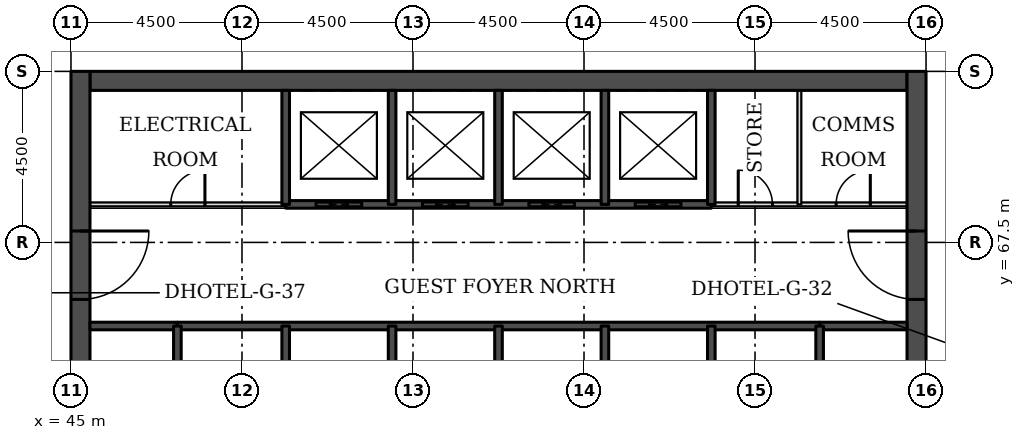
"""IFC4 building model, lengths in metres.
Left out: names, types, materials, properties, quantities, classifications, styles, units other than length and angle.
Written with IfcOpenShell. Run it as: python <this file> out.ifc"""

import sys

from ifc_helpers import new_model, si_unit, direction, frame, frame_2d, origin, place, context, subcontext, project, spatial, rectangle, extrude, element, fill, save


model = new_model("IFC4")
c1 = context("Model", 3, precision=1e-05, world=origin(), true_north=direction((0.0, 1.0)))
c2 = subcontext(c1, "Body", "Model", "MODEL_VIEW")
j1 = project(units=[si_unit("LENGTHUNIT", "METRE"), si_unit("PLANEANGLEUNIT", "RADIAN")], contexts=[c1])
p1 = place(None, origin())
s1 = spatial("IfcSite", under=j1, at=p1, CompositionType="ELEMENT")
p2 = place(p1, origin())
s2 = spatial("IfcBuilding", under=s1, at=p2, CompositionType="ELEMENT")
p3 = place(p2, frame((0.0, 0.0, 66.0)))
s3 = spatial("IfcBuildingStorey", under=s2, at=p3, CompositionType="ELEMENT", Elevation=66.0)
p4 = place(p3, frame((45.5, 71.75, 0.0), z_axis=(0.0, 0.0, 1.0), x_axis=(1.0, 0.0, 0.0)))
e1 = element("IfcWall", 1, at=p4, inside=s3, PredefinedType="SHEAR", context=c2, shape_type="SweptSolid", body=[
    extrude(rectangle(XDim=21.5, YDim=0.5, at=frame_2d((10.75, 0.0))), origin(), (0.0, 0.0, 1.0), 3.3),
])
p5 = place(p3, frame((45.25, 49.5, 0.0), z_axis=(0.0, 0.0, 1.0), x_axis=(0.0, 1.0, 0.0)))
e2 = element("IfcWall", 2, at=p5, inside=s3, PredefinedType="SHEAR", context=c2, shape_type="SweptSolid", body=[
    extrude(rectangle(XDim=22.5, YDim=0.5, at=frame_2d((11.25, 0.0))), origin(), (0.0, 0.0, 1.0), 3.3),
])
p6 = place(p5, frame((4.2, 0.0, 0.0)))
e3 = element("IfcOpeningElement", 3, at=p6, cuts=e2, PredefinedType="OPENING", context=c2, shape_type="SweptSolid", body=[
    extrude(rectangle(XDim=1.8, YDim=2.1, at=frame_2d((0.9, 1.05))), frame((0.0, 0.26, 0.0), z_axis=(0.0, -1.0, 0.0), x_axis=(1.0, 0.0, 0.0)), (0.0, 0.0, 1.0), 0.52),
])
p7 = place(p5, frame((6.9, 0.0, 0.0)))
e4 = element("IfcOpeningElement", 4, at=p7, cuts=e2, PredefinedType="OPENING", context=c2, shape_type="SweptSolid", body=[
    extrude(rectangle(XDim=1.1, YDim=2.1, at=frame_2d((0.55, 1.05))), frame((0.0, 0.26, 0.0), z_axis=(0.0, -1.0, 0.0), x_axis=(1.0, 0.0, 0.0)), (0.0, 0.0, 1.0), 0.52),
])
p8 = place(p5, frame((13.6, 0.0, 0.0)))
e5 = element("IfcOpeningElement", 5, at=p8, cuts=e2, PredefinedType="OPENING", context=c2, shape_type="SweptSolid", body=[
    extrude(rectangle(XDim=1.1, YDim=2.1, at=frame_2d((0.55, 1.05))), frame((0.0, 0.26, 0.0), z_axis=(0.0, -1.0, 0.0), x_axis=(1.0, 0.0, 0.0)), (0.0, 0.0, 1.0), 0.52),
])
p9 = place(p5, frame((16.5, 0.0, 0.0)))
e6 = element("IfcOpeningElement", 6, at=p9, cuts=e2, PredefinedType="OPENING", context=c2, shape_type="SweptSolid", body=[
    extrude(rectangle(XDim=1.8, YDim=2.1, at=frame_2d((0.9, 1.05))), frame((0.0, 0.26, 0.0), z_axis=(0.0, -1.0, 0.0), x_axis=(1.0, 0.0, 0.0)), (0.0, 0.0, 1.0), 0.52),
])
p10 = place(p3, frame((67.25, 49.5, 0.0), z_axis=(0.0, 0.0, 1.0), x_axis=(0.0, 1.0, 0.0)))
e7 = element("IfcWall", 7, at=p10, inside=s3, PredefinedType="SHEAR", context=c2, shape_type="SweptSolid", body=[
    extrude(rectangle(XDim=22.5, YDim=0.5, at=frame_2d((11.25, 0.0))), origin(), (0.0, 0.0, 1.0), 3.3),
])
p11 = place(p10, frame((4.2, 0.0, 0.0)))
e8 = element("IfcOpeningElement", 8, at=p11, cuts=e7, PredefinedType="OPENING", context=c2, shape_type="SweptSolid", body=[
    extrude(rectangle(XDim=1.8, YDim=2.1, at=frame_2d((0.9, 1.05))), frame((0.0, 0.26, 0.0), z_axis=(0.0, -1.0, 0.0), x_axis=(1.0, 0.0, 0.0)), (0.0, 0.0, 1.0), 0.52),
])
p12 = place(p10, frame((6.9, 0.0, 0.0)))
e9 = element("IfcOpeningElement", 9, at=p12, cuts=e7, PredefinedType="OPENING", context=c2, shape_type="SweptSolid", body=[
    extrude(rectangle(XDim=1.1, YDim=2.1, at=frame_2d((0.55, 1.05))), frame((0.0, 0.26, 0.0), z_axis=(0.0, -1.0, 0.0), x_axis=(1.0, 0.0, 0.0)), (0.0, 0.0, 1.0), 0.52),
])
p13 = place(p10, frame((13.6, 0.0, 0.0)))
e10 = element("IfcOpeningElement", 10, at=p13, cuts=e7, PredefinedType="OPENING", context=c2, shape_type="SweptSolid", body=[
    extrude(rectangle(XDim=1.1, YDim=2.1, at=frame_2d((0.55, 1.05))), frame((0.0, 0.26, 0.0), z_axis=(0.0, -1.0, 0.0), x_axis=(1.0, 0.0, 0.0)), (0.0, 0.0, 1.0), 0.52),
])
p14 = place(p10, frame((16.5, 0.0, 0.0)))
e11 = element("IfcOpeningElement", 11, at=p14, cuts=e7, PredefinedType="OPENING", context=c2, shape_type="SweptSolid", body=[
    extrude(rectangle(XDim=1.8, YDim=2.1, at=frame_2d((0.9, 1.05))), frame((0.0, 0.26, 0.0), z_axis=(0.0, -1.0, 0.0), x_axis=(1.0, 0.0, 0.0)), (0.0, 0.0, 1.0), 0.52),
])
for number, where, z_axis, x_axis in (
    (12, (45.5, 65.3, 0.0), (0.0, 0.0, 1.0), (1.0, 0.0, 0.0)),
    (13, (64.7, 65.3, 0.0), (0.0, 0.0, 1.0), (1.0, 0.0, 0.0)),
):
    element("IfcWall", number, at=place(p3, frame(where, z_axis=z_axis, x_axis=x_axis)), inside=s3, PredefinedType="SOLIDWALL", context=c2, shape_type="SweptSolid", body=[
        extrude(rectangle(XDim=2.3, YDim=0.2, at=frame_2d((1.15, 0.0))), origin(), (0.0, 0.0, 1.0), 3.08),
    ])
p15 = place(p3, frame((47.8, 65.3, 0.0), z_axis=(0.0, 0.0, 1.0), x_axis=(1.0, 0.0, 0.0)))
e14 = element("IfcWall", 14, at=p15, inside=s3, PredefinedType="SOLIDWALL", context=c2, shape_type="SweptSolid", body=[
    extrude(rectangle(XDim=16.9, YDim=0.2, at=frame_2d((8.45, 0.0))), origin(), (0.0, 0.0, 1.0), 3.08),
])
p16 = place(p3, frame((45.5, 68.5, 0.0), z_axis=(0.0, 0.0, 1.0), x_axis=(1.0, 0.0, 0.0)))
e15 = element("IfcWall", 15, at=p16, inside=s3, PredefinedType="PARTITIONING", context=c2, shape_type="SweptSolid", body=[
    extrude(rectangle(XDim=5.15, YDim=0.1, at=frame_2d((2.575, 0.0))), origin(), (0.0, 0.0, 1.0), 3.08),
])
p17 = place(p16, frame((2.125, 0.0, 0.0)))
e16 = element("IfcOpeningElement", 16, at=p17, cuts=e15, PredefinedType="OPENING", context=c2, shape_type="SweptSolid", body=[
    extrude(rectangle(XDim=0.9, YDim=2.1, at=frame_2d((0.45, 1.05))), frame((0.0, 0.06, 0.0), z_axis=(0.0, -1.0, 0.0), x_axis=(1.0, 0.0, 0.0)), (0.0, 0.0, 1.0), 0.12),
])
p18 = place(p3, frame((61.85, 68.5, 0.0), z_axis=(0.0, 0.0, 1.0), x_axis=(1.0, 0.0, 0.0)))
e17 = element("IfcWall", 17, at=p18, inside=s3, PredefinedType="PARTITIONING", context=c2, shape_type="SweptSolid", body=[
    extrude(rectangle(XDim=5.15, YDim=0.1, at=frame_2d((2.575, 0.0))), origin(), (0.0, 0.0, 1.0), 3.08),
])
p19 = place(p18, frame((3.284, 0.0, 0.0)))
e18 = element("IfcOpeningElement", 18, at=p19, cuts=e17, PredefinedType="OPENING", context=c2, shape_type="SweptSolid", body=[
    extrude(rectangle(XDim=0.9, YDim=2.1, at=frame_2d((0.45, 1.05))), frame((0.0, 0.06, 0.0), z_axis=(0.0, -1.0, 0.0), x_axis=(1.0, 0.0, 0.0)), (0.0, 0.0, 1.0), 0.12),
])
p20 = place(p18, frame((0.709, 0.0, 0.0)))
e19 = element("IfcOpeningElement", 19, at=p20, cuts=e17, PredefinedType="OPENING", context=c2, shape_type="SweptSolid", body=[
    extrude(rectangle(XDim=0.9, YDim=2.1, at=frame_2d((0.45, 1.05))), frame((0.0, 0.06, 0.0), z_axis=(0.0, -1.0, 0.0), x_axis=(1.0, 0.0, 0.0)), (0.0, 0.0, 1.0), 0.12),
])
p21 = place(p3, frame((50.65, 68.5, 0.0), z_axis=(0.0, 0.0, 1.0), x_axis=(1.0, 0.0, 0.0)))
e20 = element("IfcWall", 20, at=p21, inside=s3, PredefinedType="SOLIDWALL", context=c2, shape_type="SweptSolid", body=[
    extrude(rectangle(XDim=11.2, YDim=0.2, at=frame_2d((5.6, 0.0))), origin(), (0.0, 0.0, 1.0), 3.08),
])
p22 = place(p21, frame((0.8, 0.0, 0.0)))
e21 = element("IfcOpeningElement", 21, at=p22, cuts=e20, PredefinedType="OPENING", context=c2, shape_type="SweptSolid", body=[
    extrude(rectangle(XDim=1.2, YDim=2.1, at=frame_2d((0.6, 1.05))), frame((0.0, 0.11, 0.0), z_axis=(0.0, -1.0, 0.0), x_axis=(1.0, 0.0, 0.0)), (0.0, 0.0, 1.0), 0.22),
])
p23 = place(p21, frame((3.6, 0.0, 0.0)))
e22 = element("IfcOpeningElement", 22, at=p23, cuts=e20, PredefinedType="OPENING", context=c2, shape_type="SweptSolid", body=[
    extrude(rectangle(XDim=1.2, YDim=2.1, at=frame_2d((0.6, 1.05))), frame((0.0, 0.11, 0.0), z_axis=(0.0, -1.0, 0.0), x_axis=(1.0, 0.0, 0.0)), (0.0, 0.0, 1.0), 0.22),
])
p24 = place(p21, frame((6.4, 0.0, 0.0)))
e23 = element("IfcOpeningElement", 23, at=p24, cuts=e20, PredefinedType="OPENING", context=c2, shape_type="SweptSolid", body=[
    extrude(rectangle(XDim=1.2, YDim=2.1, at=frame_2d((0.6, 1.05))), frame((0.0, 0.11, 0.0), z_axis=(0.0, -1.0, 0.0), x_axis=(1.0, 0.0, 0.0)), (0.0, 0.0, 1.0), 0.22),
])
p25 = place(p21, frame((9.2, 0.0, 0.0)))
e24 = element("IfcOpeningElement", 24, at=p25, cuts=e20, PredefinedType="OPENING", context=c2, shape_type="SweptSolid", body=[
    extrude(rectangle(XDim=1.2, YDim=2.1, at=frame_2d((0.6, 1.05))), frame((0.0, 0.11, 0.0), z_axis=(0.0, -1.0, 0.0), x_axis=(1.0, 0.0, 0.0)), (0.0, 0.0, 1.0), 0.22),
])
p26 = place(p3, frame((47.8, 62.0, 0.0), z_axis=(0.0, 0.0, 1.0), x_axis=(0.0, 1.0, 0.0)))
e25 = element("IfcWall", 25, at=p26, inside=s3, PredefinedType="SOLIDWALL", context=c2, shape_type="SweptSolid", body=[
    extrude(rectangle(XDim=3.3, YDim=0.2, at=frame_2d((1.65, 0.0))), origin(), (0.0, 0.0, 1.0), 3.08),
])
p27 = place(p26, frame((1.1, 0.0, 0.0)))
e26 = element("IfcOpeningElement", 26, at=p27, cuts=e25, PredefinedType="OPENING", context=c2, shape_type="SweptSolid", body=[
    extrude(rectangle(XDim=1.1, YDim=2.1, at=frame_2d((0.55, 1.05))), frame((0.0, 0.11, 0.0), z_axis=(0.0, -1.0, 0.0), x_axis=(1.0, 0.0, 0.0)), (0.0, 0.0, 1.0), 0.22),
])
p28 = place(p3, frame((50.65, 62.0, 0.0), z_axis=(0.0, 0.0, 1.0), x_axis=(0.0, 1.0, 0.0)))
e27 = element("IfcWall", 27, at=p28, inside=s3, PredefinedType="SOLIDWALL", context=c2, shape_type="SweptSolid", body=[
    extrude(rectangle(XDim=3.3, YDim=0.2, at=frame_2d((1.65, 0.0))), origin(), (0.0, 0.0, 1.0), 3.08),
])
p29 = place(p3, frame((50.65, 68.5, 0.0), z_axis=(0.0, 0.0, 1.0), x_axis=(0.0, 1.0, 0.0)))
e28 = element("IfcWall", 28, at=p29, inside=s3, PredefinedType="SOLIDWALL", context=c2, shape_type="SweptSolid", body=[
    extrude(rectangle(XDim=3.0, YDim=0.2, at=frame_2d((1.5, 0.0))), origin(), (0.0, 0.0, 1.0), 3.08),
])
p30 = place(p3, frame((53.45, 62.5, 0.0), z_axis=(0.0, 0.0, 1.0), x_axis=(0.0, 1.0, 0.0)))
e29 = element("IfcWall", 29, at=p30, inside=s3, PredefinedType="SOLIDWALL", context=c2, shape_type="SweptSolid", body=[
    extrude(rectangle(XDim=2.8, YDim=0.2, at=frame_2d((1.4, 0.0))), origin(), (0.0, 0.0, 1.0), 3.08),
])
p31 = place(p3, frame((53.45, 68.5, 0.0), z_axis=(0.0, 0.0, 1.0), x_axis=(0.0, 1.0, 0.0)))
e30 = element("IfcWall", 30, at=p31, inside=s3, PredefinedType="SOLIDWALL", context=c2, shape_type="SweptSolid", body=[
    extrude(rectangle(XDim=3.0, YDim=0.2, at=frame_2d((1.5, 0.0))), origin(), (0.0, 0.0, 1.0), 3.08),
])
p32 = place(p3, frame((56.25, 62.5, 0.0), z_axis=(0.0, 0.0, 1.0), x_axis=(0.0, 1.0, 0.0)))
e31 = element("IfcWall", 31, at=p32, inside=s3, PredefinedType="SOLIDWALL", context=c2, shape_type="SweptSolid", body=[
    extrude(rectangle(XDim=2.8, YDim=0.2, at=frame_2d((1.4, 0.0))), origin(), (0.0, 0.0, 1.0), 3.08),
])
p33 = place(p3, frame((56.25, 68.5, 0.0), z_axis=(0.0, 0.0, 1.0), x_axis=(0.0, 1.0, 0.0)))
e32 = element("IfcWall", 32, at=p33, inside=s3, PredefinedType="SOLIDWALL", context=c2, shape_type="SweptSolid", body=[
    extrude(rectangle(XDim=3.0, YDim=0.2, at=frame_2d((1.5, 0.0))), origin(), (0.0, 0.0, 1.0), 3.08),
])
p34 = place(p3, frame((59.05, 62.5, 0.0), z_axis=(0.0, 0.0, 1.0), x_axis=(0.0, 1.0, 0.0)))
e33 = element("IfcWall", 33, at=p34, inside=s3, PredefinedType="SOLIDWALL", context=c2, shape_type="SweptSolid", body=[
    extrude(rectangle(XDim=2.8, YDim=0.2, at=frame_2d((1.4, 0.0))), origin(), (0.0, 0.0, 1.0), 3.08),
])
p35 = place(p3, frame((59.05, 68.5, 0.0), z_axis=(0.0, 0.0, 1.0), x_axis=(0.0, 1.0, 0.0)))
e34 = element("IfcWall", 34, at=p35, inside=s3, PredefinedType="SOLIDWALL", context=c2, shape_type="SweptSolid", body=[
    extrude(rectangle(XDim=3.0, YDim=0.2, at=frame_2d((1.5, 0.0))), origin(), (0.0, 0.0, 1.0), 3.08),
])
p36 = place(p3, frame((61.85, 62.0, 0.0), z_axis=(0.0, 0.0, 1.0), x_axis=(0.0, 1.0, 0.0)))
e35 = element("IfcWall", 35, at=p36, inside=s3, PredefinedType="SOLIDWALL", context=c2, shape_type="SweptSolid", body=[
    extrude(rectangle(XDim=3.3, YDim=0.2, at=frame_2d((1.65, 0.0))), origin(), (0.0, 0.0, 1.0), 3.08),
])
p37 = place(p3, frame((61.85, 68.5, 0.0), z_axis=(0.0, 0.0, 1.0), x_axis=(0.0, 1.0, 0.0)))
e36 = element("IfcWall", 36, at=p37, inside=s3, PredefinedType="SOLIDWALL", context=c2, shape_type="SweptSolid", body=[
    extrude(rectangle(XDim=3.0, YDim=0.2, at=frame_2d((1.5, 0.0))), origin(), (0.0, 0.0, 1.0), 3.08),
])
p38 = place(p3, frame((64.167, 68.5, 0.0), z_axis=(0.0, 0.0, 1.0), x_axis=(0.0, 1.0, 0.0)))
e37 = element("IfcWall", 37, at=p38, inside=s3, PredefinedType="PARTITIONING", context=c2, shape_type="SweptSolid", body=[
    extrude(rectangle(XDim=3.0, YDim=0.1, at=frame_2d((1.5, 0.0))), origin(), (0.0, 0.0, 1.0), 3.08),
])
p39 = place(p3, frame((64.7, 62.0, 0.0), z_axis=(0.0, 0.0, 1.0), x_axis=(0.0, 1.0, 0.0)))
e38 = element("IfcWall", 38, at=p39, inside=s3, PredefinedType="SOLIDWALL", context=c2, shape_type="SweptSolid", body=[
    extrude(rectangle(XDim=3.3, YDim=0.2, at=frame_2d((1.65, 0.0))), origin(), (0.0, 0.0, 1.0), 3.08),
])
p40 = place(p39, frame((1.1, 0.0, 0.0)))
e39 = element("IfcOpeningElement", 39, at=p40, cuts=e38, PredefinedType="OPENING", context=c2, shape_type="SweptSolid", body=[
    extrude(rectangle(XDim=1.1, YDim=2.1, at=frame_2d((0.55, 1.05))), frame((0.0, 0.11, 0.0), z_axis=(0.0, -1.0, 0.0), x_axis=(1.0, 0.0, 0.0)), (0.0, 0.0, 1.0), 0.22),
])
p41 = place(p22, origin())
e40 = element("IfcDoor", 40, at=p41, inside=s3, OperationType="DOUBLE_DOOR_SLIDING", PredefinedType="DOOR", context=c2, shape_type="SweptSolid", body=[
    extrude(rectangle(XDim=1.2, YDim=2.1, at=frame_2d((0.6, 1.05))), frame((0.0, 0.025, 0.0), z_axis=(0.0, -1.0, 0.0), x_axis=(1.0, 0.0, 0.0)), (0.0, 0.0, 1.0), 0.05),
])
fill(e21, e40)
p42 = place(p23, origin())
e41 = element("IfcDoor", 41, at=p42, inside=s3, OperationType="DOUBLE_DOOR_SLIDING", PredefinedType="DOOR", context=c2, shape_type="SweptSolid", body=[
    extrude(rectangle(XDim=1.2, YDim=2.1, at=frame_2d((0.6, 1.05))), frame((0.0, 0.025, 0.0), z_axis=(0.0, -1.0, 0.0), x_axis=(1.0, 0.0, 0.0)), (0.0, 0.0, 1.0), 0.05),
])
fill(e22, e41)
p43 = place(p24, origin())
e42 = element("IfcDoor", 42, at=p43, inside=s3, OperationType="DOUBLE_DOOR_SLIDING", PredefinedType="DOOR", context=c2, shape_type="SweptSolid", body=[
    extrude(rectangle(XDim=1.2, YDim=2.1, at=frame_2d((0.6, 1.05))), frame((0.0, 0.025, 0.0), z_axis=(0.0, -1.0, 0.0), x_axis=(1.0, 0.0, 0.0)), (0.0, 0.0, 1.0), 0.05),
])
fill(e23, e42)
p44 = place(p25, origin())
e43 = element("IfcDoor", 43, at=p44, inside=s3, OperationType="DOUBLE_DOOR_SLIDING", PredefinedType="DOOR", context=c2, shape_type="SweptSolid", body=[
    extrude(rectangle(XDim=1.2, YDim=2.1, at=frame_2d((0.6, 1.05))), frame((0.0, 0.025, 0.0), z_axis=(0.0, -1.0, 0.0), x_axis=(1.0, 0.0, 0.0)), (0.0, 0.0, 1.0), 0.05),
])
fill(e24, e43)
p45 = place(p9, frame((1.8, 0.0, 0.0), z_axis=(0.0, 0.0, 1.0), x_axis=(-1.0, 0.0, 0.0)))
e44 = element("IfcDoor", 44, at=p45, inside=s3, OperationType="SINGLE_SWING_LEFT", PredefinedType="DOOR", context=c2, shape_type="SweptSolid", body=[
    extrude(rectangle(XDim=1.8, YDim=2.1, at=frame_2d((0.9, 1.05))), frame((0.0, 0.025, 0.0), z_axis=(0.0, -1.0, 0.0), x_axis=(1.0, 0.0, 0.0)), (0.0, 0.0, 1.0), 0.05),
])
fill(e6, e44)
p46 = place(p14, origin())
e45 = element("IfcDoor", 45, at=p46, inside=s3, OperationType="SINGLE_SWING_RIGHT", PredefinedType="DOOR", context=c2, shape_type="SweptSolid", body=[
    extrude(rectangle(XDim=1.8, YDim=2.1, at=frame_2d((0.9, 1.05))), frame((0.0, 0.025, 0.0), z_axis=(0.0, -1.0, 0.0), x_axis=(1.0, 0.0, 0.0)), (0.0, 0.0, 1.0), 0.05),
])
fill(e11, e45)
p47 = place(p19, origin())
e46 = element("IfcDoor", 46, at=p47, inside=s3, OperationType="SINGLE_SWING_RIGHT", PredefinedType="DOOR", context=c2, shape_type="SweptSolid", body=[
    extrude(rectangle(XDim=0.9, YDim=2.1, at=frame_2d((0.45, 1.05))), frame((0.0, 0.025, 0.0), z_axis=(0.0, -1.0, 0.0), x_axis=(1.0, 0.0, 0.0)), (0.0, 0.0, 1.0), 0.05),
])
fill(e18, e46)
p48 = place(p20, origin())
e47 = element("IfcDoor", 47, at=p48, inside=s3, OperationType="SINGLE_SWING_LEFT", PredefinedType="DOOR", context=c2, shape_type="SweptSolid", body=[
    extrude(rectangle(XDim=0.9, YDim=2.1, at=frame_2d((0.45, 1.05))), frame((0.0, 0.025, 0.0), z_axis=(0.0, -1.0, 0.0), x_axis=(1.0, 0.0, 0.0)), (0.0, 0.0, 1.0), 0.05),
])
fill(e19, e47)
p49 = place(p17, origin())
e48 = element("IfcDoor", 48, at=p49, inside=s3, OperationType="SINGLE_SWING_RIGHT", PredefinedType="DOOR", context=c2, shape_type="SweptSolid", body=[
    extrude(rectangle(XDim=0.9, YDim=2.1, at=frame_2d((0.45, 1.05))), frame((0.0, 0.025, 0.0), z_axis=(0.0, -1.0, 0.0), x_axis=(1.0, 0.0, 0.0)), (0.0, 0.0, 1.0), 0.05),
])
fill(e16, e48)
save(model, sys.argv[1])
